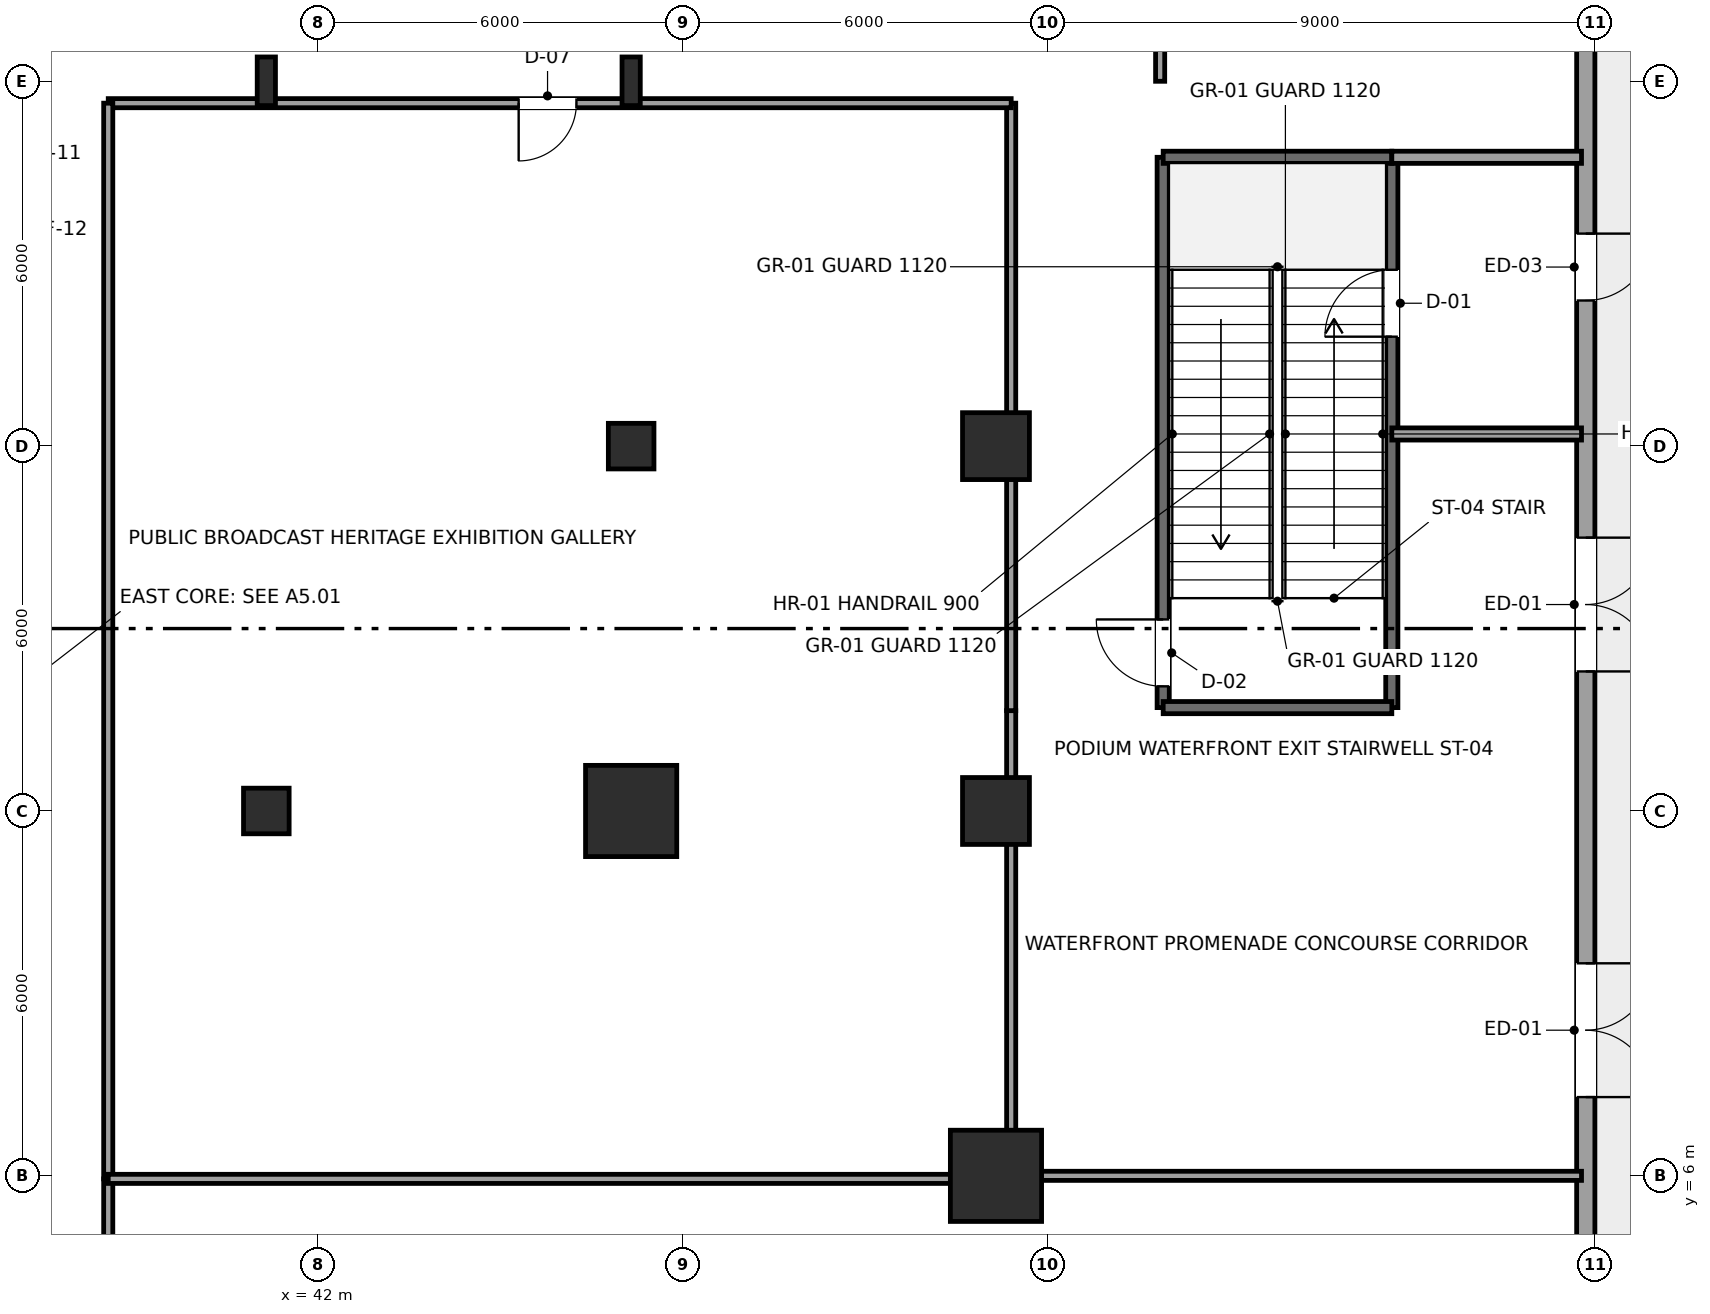
"""IFC4 building model, lengths in metres.
Left out: names, types, materials, properties, quantities, classifications, styles, units other than length and angle.
Written with IfcOpenShell. Run it as: python <this file> out.ifc"""

import sys

from ifc_helpers import new_model, si_unit, direction, frame, frame_2d, origin, origin_2d, place, context, subcontext, project, spatial, rectangle, hollow_rectangle, i_section, extrude, element, fill, save


model = new_model("IFC4")
c1 = context("Model", 3, precision=1e-05, world=origin(), true_north=direction((0.0, 1.0)))
c2 = subcontext(c1, "Body", "Model", "MODEL_VIEW")
j1 = project(units=[si_unit("LENGTHUNIT", "METRE"), si_unit("PLANEANGLEUNIT", "RADIAN")], contexts=[c1])
p1 = place(None, origin())
s1 = spatial("IfcSite", under=j1, at=p1, CompositionType="ELEMENT")
p2 = place(p1, origin())
s2 = spatial("IfcBuilding", under=s1, at=p2, CompositionType="ELEMENT")
p3 = place(p2, origin())
s3 = spatial("IfcBuildingStorey", under=s2, at=p3, CompositionType="ELEMENT", Elevation=0.0)
p4 = place(p3, frame((41.15, 12.0, 0.0), z_axis=(0.0, 0.0, 1.0), x_axis=(1.0, 0.0, 0.0)))
e1 = element("IfcColumn", 1, at=p4, inside=s3, PredefinedType="COLUMN", context=c2, shape_type="SweptSolid", body=[
    extrude(hollow_rectangle(XDim=0.75, YDim=0.75, WallThickness=0.035, InnerFilletRadius=0.035, OuterFilletRadius=0.05, at=origin_2d()), origin(), (0.0, 0.0, 1.0), 5.7),
])
p5 = place(p3, frame((41.15, 24.0, 0.0), z_axis=(0.0, 0.0, 1.0), x_axis=(1.0, 0.0, 0.0)))
e2 = element("IfcColumn", 2, at=p5, inside=s3, PredefinedType="COLUMN", context=c2, shape_type="SweptSolid", body=[
    extrude(i_section(OverallWidth=0.3, OverallDepth=0.8, WebThickness=0.018, FlangeThickness=0.033, FilletRadius=0.03, at=origin_2d()), origin(), (0.0, 0.0, 1.0), 5.7),
])
p6 = place(p3, frame((47.15, 12.0, 0.0), z_axis=(0.0, 0.0, 1.0), x_axis=(1.0, 0.0, 0.0)))
e3 = element("IfcColumn", 3, at=p6, inside=s3, PredefinedType="COLUMN", context=c2, shape_type="SweptSolid", body=[
    extrude(rectangle(XDim=1.5, YDim=1.5, at=origin_2d()), origin(), (0.0, 0.0, 1.0), 5.7),
])
p7 = place(p3, frame((47.15, 18.0, 0.0), z_axis=(0.0, 0.0, 1.0), x_axis=(1.0, 0.0, 0.0)))
e4 = element("IfcColumn", 4, at=p7, inside=s3, PredefinedType="COLUMN", context=c2, shape_type="SweptSolid", body=[
    extrude(hollow_rectangle(XDim=0.75, YDim=0.75, WallThickness=0.035, InnerFilletRadius=0.035, OuterFilletRadius=0.05, at=origin_2d()), origin(), (0.0, 0.0, 1.0), 5.7),
])
p8 = place(p3, frame((47.15, 24.0, 0.0), z_axis=(0.0, 0.0, 1.0), x_axis=(1.0, 0.0, 0.0)))
e5 = element("IfcColumn", 5, at=p8, inside=s3, PredefinedType="COLUMN", context=c2, shape_type="SweptSolid", body=[
    extrude(i_section(OverallWidth=0.3, OverallDepth=0.8, WebThickness=0.018, FlangeThickness=0.033, FilletRadius=0.03, at=origin_2d()), origin(), (0.0, 0.0, 1.0), 5.7),
])
p9 = place(p3, frame((53.15, 6.0, 0.0), z_axis=(0.0, 0.0, 1.0), x_axis=(1.0, 0.0, 0.0)))
e6 = element("IfcColumn", 6, at=p9, inside=s3, PredefinedType="COLUMN", context=c2, shape_type="SweptSolid", body=[
    extrude(rectangle(XDim=1.5, YDim=1.5, at=origin_2d()), origin(), (0.0, 0.0, 1.0), 5.7),
])
for number, where, z_axis, x_axis in (
    (7, (53.15, 12.0, 0.0), (0.0, 0.0, 1.0), (1.0, 0.0, 0.0)),
    (8, (53.15, 18.0, 0.0), (0.0, 0.0, 1.0), (1.0, 0.0, 0.0)),
):
    element("IfcColumn", number, at=place(p3, frame(where, z_axis=z_axis, x_axis=x_axis)), inside=s3, PredefinedType="COLUMN", context=c2, shape_type="SweptSolid", body=[
        extrude(rectangle(XDim=1.1, YDim=1.1, at=origin_2d()), origin(), (0.0, 0.0, 1.0), 5.7),
    ])
p10 = place(p3, frame((62.85, 29.295, 0.0), z_axis=(0.0, 0.0, 1.0), x_axis=(0.0, -1.0, 0.0)))
e9 = element("IfcWall", 9, at=p10, inside=s3, PredefinedType="SOLIDWALL", context=c2, shape_type="SweptSolid", body=[
    extrude(rectangle(XDim=26.295, YDim=0.3, at=frame_2d((13.147, 0.0))), origin(), (0.0, 0.0, 1.0), 5.4),
])
p11 = place(p10, frame((7.8, 0.0, 0.0)))
e10 = element("IfcOpeningElement", 10, at=p11, cuts=e9, PredefinedType="OPENING", context=c2, shape_type="SweptSolid", body=[
    extrude(rectangle(XDim=1.1, YDim=2.2, at=frame_2d((0.55, 1.1))), frame((0.0, 0.16, 0.0), z_axis=(0.0, -1.0, 0.0), x_axis=(1.0, 0.0, 0.0)), (0.0, 0.0, 1.0), 0.32),
])
p12 = place(p10, frame((12.8, 0.0, 0.0)))
e11 = element("IfcOpeningElement", 11, at=p12, cuts=e9, PredefinedType="OPENING", context=c2, shape_type="SweptSolid", body=[
    extrude(rectangle(XDim=2.2, YDim=2.6, at=frame_2d((1.1, 1.3))), frame((0.0, 0.16, 0.0), z_axis=(0.0, -1.0, 0.0), x_axis=(1.0, 0.0, 0.0)), (0.0, 0.0, 1.0), 0.32),
])
p13 = place(p10, frame((19.8, 0.0, 0.0)))
e12 = element("IfcOpeningElement", 12, at=p13, cuts=e9, PredefinedType="OPENING", context=c2, shape_type="SweptSolid", body=[
    extrude(rectangle(XDim=2.2, YDim=2.6, at=frame_2d((1.1, 1.3))), frame((0.0, 0.16, 0.0), z_axis=(0.0, -1.0, 0.0), x_axis=(1.0, 0.0, 0.0)), (0.0, 0.0, 1.0), 0.32),
])
p14 = place(p3, frame((55.9, 13.7, 0.0), z_axis=(0.0, 0.0, 1.0), x_axis=(0.0, 1.0, 0.0)))
e13 = element("IfcWall", 13, at=p14, inside=s3, PredefinedType="SHEAR", context=c2, shape_type="SweptSolid", body=[
    extrude(rectangle(XDim=9.05, YDim=0.2, at=frame_2d((4.525, 0.0))), origin(), (0.0, 0.0, 1.0), 5.4),
])
p15 = place(p14, frame((0.35, 0.0, 0.0)))
e14 = element("IfcOpeningElement", 14, at=p15, cuts=e13, PredefinedType="OPENING", context=c2, shape_type="SweptSolid", body=[
    extrude(rectangle(XDim=1.1, YDim=2.2, at=frame_2d((0.55, 1.1))), frame((0.0, 0.11, 0.0), z_axis=(0.0, -1.0, 0.0), x_axis=(1.0, 0.0, 0.0)), (0.0, 0.0, 1.0), 0.22),
])
p16 = place(p3, frame((59.66, 13.7, 0.0), z_axis=(0.0, 0.0, 1.0), x_axis=(0.0, 1.0, 0.0)))
e15 = element("IfcWall", 15, at=p16, inside=s3, PredefinedType="SHEAR", context=c2, shape_type="SweptSolid", body=[
    extrude(rectangle(XDim=9.05, YDim=0.2, at=frame_2d((4.525, 0.0))), origin(), (0.0, 0.0, 1.0), 5.4),
])
p17 = place(p16, frame((6.1, 0.0, 0.0)))
e16 = element("IfcOpeningElement", 16, at=p17, cuts=e15, PredefinedType="OPENING", context=c2, shape_type="SweptSolid", body=[
    extrude(rectangle(XDim=1.1, YDim=2.2, at=frame_2d((0.55, 1.1))), frame((0.0, 0.11, 0.0), z_axis=(0.0, -1.0, 0.0), x_axis=(1.0, 0.0, 0.0)), (0.0, 0.0, 1.0), 0.22),
])
for number, where, z_axis, x_axis in (
    (17, (55.9, 13.7, 0.0), (0.0, 0.0, 1.0), (1.0, 0.0, 0.0)),
    (18, (55.9, 22.75, 0.0), (0.0, 0.0, 1.0), (1.0, 0.0, 0.0)),
):
    element("IfcWall", number, at=place(p3, frame(where, z_axis=z_axis, x_axis=x_axis)), inside=s3, PredefinedType="SHEAR", context=c2, shape_type="SweptSolid", body=[
        extrude(rectangle(XDim=3.76, YDim=0.2, at=frame_2d((1.88, 0.0))), origin(), (0.0, 0.0, 1.0), 5.4),
    ])
for number, where, z_axis, x_axis in (
    (19, (59.66, 18.2, 0.0), (0.0, 0.0, 1.0), (1.0, 0.0, 0.0)),
    (20, (59.66, 22.75, 0.0), (0.0, 0.0, 1.0), (1.0, 0.0, 0.0)),
):
    element("IfcWall", number, at=place(p3, frame(where, z_axis=z_axis, x_axis=x_axis)), inside=s3, PredefinedType="SOLIDWALL", context=c2, shape_type="SweptSolid", body=[
        extrude(rectangle(XDim=3.12, YDim=0.2, at=frame_2d((1.56, 0.0))), origin(), (0.0, 0.0, 1.0), 5.4),
    ])
p18 = place(p3, frame((55.85, 29.65, 0.0), z_axis=(0.0, 0.0, 1.0), x_axis=(0.0, -1.0, 0.0)))
e21 = element("IfcWall", 21, at=p18, inside=s3, PredefinedType="PARTITIONING", context=c2, shape_type="SweptSolid", body=[
    extrude(rectangle(XDim=5.65, YDim=0.15, at=frame_2d((2.825, 0.0))), origin(), (0.0, 0.0, 1.0), 5.4),
])
p19 = place(p3, frame((62.78, 6.0, 0.0), z_axis=(0.0, 0.0, 1.0), x_axis=(-1.0, 0.0, 0.0)))
e22 = element("IfcWall", 22, at=p19, inside=s3, PredefinedType="PARTITIONING", context=c2, shape_type="SweptSolid", body=[
    extrude(rectangle(XDim=9.38, YDim=0.15, at=frame_2d((4.69, 0.0))), origin(), (0.0, 0.0, 1.0), 5.4),
])
p20 = place(p3, frame((53.4, 6.0, 0.0), z_axis=(0.0, 0.0, 1.0), x_axis=(0.0, 1.0, 0.0)))
e23 = element("IfcWall", 23, at=p20, inside=s3, PredefinedType="PARTITIONING", context=c2, shape_type="SweptSolid", body=[
    extrude(rectangle(XDim=6.0, YDim=0.15, at=frame_2d((3.0, 0.0))), origin(), (0.0, 0.0, 1.0), 5.4),
])
p21 = place(p3, frame((53.4, 12.0, 0.0), z_axis=(0.0, 0.0, 1.0), x_axis=(0.0, 1.0, 0.0)))
e24 = element("IfcWall", 24, at=p21, inside=s3, PredefinedType="PARTITIONING", context=c2, shape_type="SweptSolid", body=[
    extrude(rectangle(XDim=1.65, YDim=0.15, at=frame_2d((0.825, 0.0))), origin(), (0.0, 0.0, 1.0), 5.4),
])
p22 = place(p3, frame((53.4, 13.65, 0.0), z_axis=(0.0, 0.0, 1.0), x_axis=(0.0, 1.0, 0.0)))
e25 = element("IfcWall", 25, at=p22, inside=s3, PredefinedType="PARTITIONING", context=c2, shape_type="SweptSolid", body=[
    extrude(rectangle(XDim=9.99, YDim=0.15, at=frame_2d((4.995, 0.0))), origin(), (0.0, 0.0, 1.0), 5.4),
])
p23 = place(p3, frame((53.4, 23.64, 0.0), z_axis=(0.0, 0.0, 1.0), x_axis=(-1.0, 0.0, 0.0)))
e26 = element("IfcWall", 26, at=p23, inside=s3, PredefinedType="PARTITIONING", context=c2, shape_type="SweptSolid", body=[
    extrude(rectangle(XDim=14.85, YDim=0.15, at=frame_2d((7.425, 0.0))), origin(), (0.0, 0.0, 1.0), 5.4),
])
p24 = place(p23, frame((7.15, 0.0, 0.0)))
e27 = element("IfcOpeningElement", 27, at=p24, cuts=e26, PredefinedType="OPENING", context=c2, shape_type="SweptSolid", body=[
    extrude(rectangle(XDim=0.95, YDim=2.15, at=frame_2d((0.475, 1.075))), frame((0.0, 0.085, 0.0), z_axis=(0.0, -1.0, 0.0), x_axis=(1.0, 0.0, 0.0)), (0.0, 0.0, 1.0), 0.17),
])
p25 = place(p3, frame((38.55, 23.64, 0.0), z_axis=(0.0, 0.0, 1.0), x_axis=(0.0, -1.0, 0.0)))
e28 = element("IfcWall", 28, at=p25, inside=s3, PredefinedType="PARTITIONING", context=c2, shape_type="SweptSolid", body=[
    extrude(rectangle(XDim=17.69, YDim=0.15, at=frame_2d((8.845, 0.0))), origin(), (0.0, 0.0, 1.0), 5.4),
])
p26 = place(p3, frame((38.55, 5.95, 0.0), z_axis=(0.0, 0.0, 1.0), x_axis=(0.0, -1.0, 0.0)))
e29 = element("IfcWall", 29, at=p26, inside=s3, PredefinedType="PARTITIONING", context=c2, shape_type="SweptSolid", body=[
    extrude(rectangle(XDim=2.5, YDim=0.15, at=frame_2d((1.25, 0.0))), origin(), (0.0, 0.0, 1.0), 5.4),
])
p27 = place(p3, frame((38.55, 5.95, 0.0), z_axis=(0.0, 0.0, 1.0), x_axis=(1.0, 0.0, 0.0)))
e30 = element("IfcWall", 30, at=p27, inside=s3, PredefinedType="PARTITIONING", context=c2, shape_type="SweptSolid", body=[
    extrude(rectangle(XDim=14.85, YDim=0.15, at=frame_2d((7.425, 0.0))), origin(), (0.0, 0.0, 1.0), 5.4),
])
p28 = place(p11, origin())
e31 = element("IfcDoor", 31, at=p28, inside=s3, OperationType="SINGLE_SWING_LEFT", PredefinedType="DOOR", context=c2, shape_type="SweptSolid", body=[
    extrude(rectangle(XDim=1.1, YDim=2.2, at=frame_2d((0.55, 1.1))), frame((0.0, 0.025, 0.0), z_axis=(0.0, -1.0, 0.0), x_axis=(1.0, 0.0, 0.0)), (0.0, 0.0, 1.0), 0.05),
])
fill(e10, e31)
p29 = place(p12, origin())
e32 = element("IfcDoor", 32, at=p29, inside=s3, OperationType="DOUBLE_DOOR_SINGLE_SWING", PredefinedType="DOOR", context=c2, shape_type="SweptSolid", body=[
    extrude(rectangle(XDim=2.2, YDim=2.6, at=frame_2d((1.1, 1.3))), frame((0.0, 0.025, 0.0), z_axis=(0.0, -1.0, 0.0), x_axis=(1.0, 0.0, 0.0)), (0.0, 0.0, 1.0), 0.05),
])
fill(e11, e32)
p30 = place(p13, origin())
e33 = element("IfcDoor", 33, at=p30, inside=s3, OperationType="DOUBLE_DOOR_SINGLE_SWING", PredefinedType="DOOR", context=c2, shape_type="SweptSolid", body=[
    extrude(rectangle(XDim=2.2, YDim=2.6, at=frame_2d((1.1, 1.3))), frame((0.0, 0.025, 0.0), z_axis=(0.0, -1.0, 0.0), x_axis=(1.0, 0.0, 0.0)), (0.0, 0.0, 1.0), 0.05),
])
fill(e12, e33)
p31 = place(p15, origin())
e34 = element("IfcDoor", 34, at=p31, inside=s3, OperationType="SINGLE_SWING_RIGHT", PredefinedType="DOOR", context=c2, shape_type="SweptSolid", body=[
    extrude(rectangle(XDim=1.1, YDim=2.2, at=frame_2d((0.55, 1.1))), frame((0.0, 0.025, 0.0), z_axis=(0.0, -1.0, 0.0), x_axis=(1.0, 0.0, 0.0)), (0.0, 0.0, 1.0), 0.05),
])
fill(e14, e34)
p32 = place(p17, origin())
e35 = element("IfcDoor", 35, at=p32, inside=s3, OperationType="SINGLE_SWING_LEFT", PredefinedType="DOOR", context=c2, shape_type="SweptSolid", body=[
    extrude(rectangle(XDim=1.1, YDim=2.2, at=frame_2d((0.55, 1.1))), frame((0.0, 0.025, 0.0), z_axis=(0.0, -1.0, 0.0), x_axis=(1.0, 0.0, 0.0)), (0.0, 0.0, 1.0), 0.05),
])
fill(e16, e35)
p33 = place(p24, origin())
e36 = element("IfcDoor", 36, at=p33, inside=s3, OperationType="SINGLE_SWING_RIGHT", PredefinedType="DOOR", context=c2, shape_type="SweptSolid", body=[
    extrude(rectangle(XDim=0.95, YDim=2.15, at=frame_2d((0.475, 1.075))), frame((0.0, 0.025, 0.0), z_axis=(0.0, -1.0, 0.0), x_axis=(1.0, 0.0, 0.0)), (0.0, 0.0, 1.0), 0.05),
])
fill(e27, e36)
save(model, sys.argv[1])
